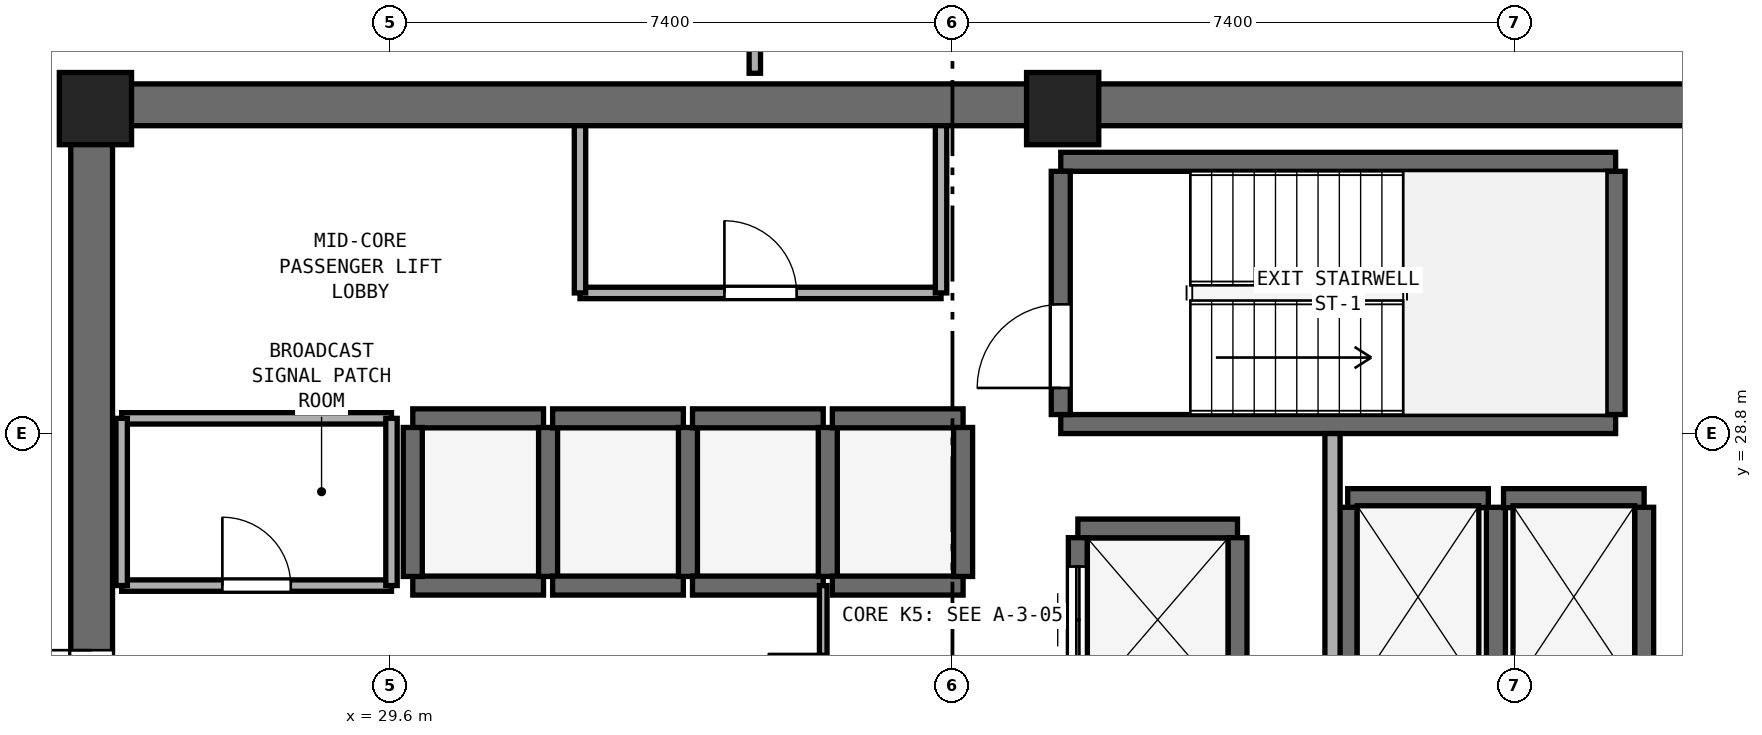
"""IFC4 building model, lengths in metres.
Left out: names, types, materials, properties, quantities, classifications, styles, units other than length and angle.
Written with IfcOpenShell. Run it as: python <this file> out.ifc"""

import sys

from ifc_helpers import new_model, si_unit, direction, frame, frame_2d, origin, origin_2d, place, context, subcontext, project, spatial, rectangle, extrude, element, fill, save


model = new_model("IFC4")
c1 = context("Model", 3, precision=1e-05, world=origin(), true_north=direction((0.0, 1.0)))
c2 = subcontext(c1, "Body", "Model", "MODEL_VIEW")
j1 = project(units=[si_unit("LENGTHUNIT", "METRE"), si_unit("PLANEANGLEUNIT", "RADIAN")], contexts=[c1])
p1 = place(None, origin())
s1 = spatial("IfcSite", under=j1, at=p1, CompositionType="ELEMENT")
p2 = place(p1, origin())
s2 = spatial("IfcBuilding", under=s1, at=p2, CompositionType="ELEMENT")
p3 = place(p2, frame((0.0, 0.0, 144.0)))
s3 = spatial("IfcBuildingStorey", under=s2, at=p3, CompositionType="ELEMENT", Elevation=144.0)
p4 = place(p3, frame((25.4, 33.125, 0.0), z_axis=(0.0, 0.0, 1.0), x_axis=(1.0, 0.0, 0.0)))
e1 = element("IfcWall", 1, at=p4, inside=s3, PredefinedType="SHEAR", context=c2, shape_type="SweptSolid", body=[
    extrude(rectangle(XDim=23.2, YDim=0.55, at=frame_2d((11.6, 0.0))), origin(), (0.0, 0.0, 1.0), 3.54),
])
p5 = place(p3, frame((25.675, 17.55, 0.0), z_axis=(0.0, 0.0, 1.0), x_axis=(0.0, 1.0, 0.0)))
e2 = element("IfcWall", 2, at=p5, inside=s3, PredefinedType="SHEAR", context=c2, shape_type="SweptSolid", body=[
    extrude(rectangle(XDim=15.3, YDim=0.55, at=frame_2d((7.65, 0.0))), origin(), (0.0, 0.0, 1.0), 3.54),
])
p6 = place(p5, frame((6.9, 0.0, 0.0)))
e3 = element("IfcOpeningElement", 3, at=p6, cuts=e2, PredefinedType="OPENING", context=c2, shape_type="SweptSolid", body=[
    extrude(rectangle(XDim=1.5, YDim=2.15, at=frame_2d((0.75, 1.075))), frame((0.0, 0.285, 0.0), z_axis=(0.0, -1.0, 0.0), x_axis=(1.0, 0.0, 0.0)), (0.0, 0.0, 1.0), 0.57),
])
for number, where, z_axis, x_axis in (
    (4, (38.45, 33.075, 0.0), (0.0, 0.0, 1.0), (1.0, 0.0, 0.0)),
    (5, (25.725, 33.075, 0.0), (0.0, 0.0, 1.0), (1.0, 0.0, 0.0)),
):
    element("IfcColumn", number, at=place(p3, frame(where, z_axis=z_axis, x_axis=x_axis)), inside=s3, PredefinedType="PILASTER", context=c2, shape_type="SweptSolid", body=[
        extrude(rectangle(XDim=0.95, YDim=0.95, at=origin_2d()), origin(), (0.0, 0.0, 1.0), 3.8),
    ])
for number, where, z_axis, x_axis in (
    (6, (38.425, 28.925, 0.0), (0.0, 0.0, 1.0), (1.0, 0.0, 0.0)),
    (7, (38.425, 32.375, 0.0), (0.0, 0.0, 1.0), (1.0, 0.0, 0.0)),
):
    element("IfcWall", number, at=place(p3, frame(where, z_axis=z_axis, x_axis=x_axis)), inside=s3, PredefinedType="SHEAR", context=c2, shape_type="SweptSolid", body=[
        extrude(rectangle(XDim=7.3, YDim=0.25, at=frame_2d((3.65, 0.0))), origin(), (0.0, 0.0, 1.0), 3.54),
    ])
p7 = place(p3, frame((38.425, 29.05, 0.0), z_axis=(0.0, 0.0, 1.0), x_axis=(0.0, 1.0, 0.0)))
e8 = element("IfcWall", 8, at=p7, inside=s3, PredefinedType="SHEAR", context=c2, shape_type="SweptSolid", body=[
    extrude(rectangle(XDim=3.2, YDim=0.25, at=frame_2d((1.6, 0.0))), origin(), (0.0, 0.0, 1.0), 3.54),
])
p8 = place(p7, frame((0.35, 0.0, 0.0)))
e9 = element("IfcOpeningElement", 9, at=p8, cuts=e8, PredefinedType="OPENING", context=c2, shape_type="SweptSolid", body=[
    extrude(rectangle(XDim=1.1, YDim=2.15, at=frame_2d((0.55, 1.075))), frame((0.0, 0.135, 0.0), z_axis=(0.0, -1.0, 0.0), x_axis=(1.0, 0.0, 0.0)), (0.0, 0.0, 1.0), 0.27),
])
p9 = place(p3, frame((45.725, 29.05, 0.0), z_axis=(0.0, 0.0, 1.0), x_axis=(0.0, 1.0, 0.0)))
e10 = element("IfcWall", 10, at=p9, inside=s3, PredefinedType="SHEAR", context=c2, shape_type="SweptSolid", body=[
    extrude(rectangle(XDim=3.2, YDim=0.25, at=frame_2d((1.6, 0.0))), origin(), (0.0, 0.0, 1.0), 3.54),
])
for number, where, z_axis, x_axis in (
    (11, (29.9, 26.8, 0.0), (0.0, 0.0, 1.0), (1.0, 0.0, 0.0)),
    (12, (29.9, 29.0, 0.0), (0.0, 0.0, 1.0), (1.0, 0.0, 0.0)),
):
    element("IfcWall", number, at=place(p3, frame(where, z_axis=z_axis, x_axis=x_axis)), inside=s3, PredefinedType="SHEAR", context=c2, shape_type="SweptSolid", body=[
        extrude(rectangle(XDim=1.72, YDim=0.25, at=frame_2d((0.86, 0.0))), origin(), (0.0, 0.0, 1.0), 3.54),
    ])
for number, where, z_axis, x_axis in (
    (13, (29.9, 26.92, 0.0), (0.0, 0.0, 1.0), (0.0, 1.0, 0.0)),
    (14, (31.68, 26.92, 0.0), (0.0, 0.0, 1.0), (0.0, 1.0, 0.0)),
):
    element("IfcWall", number, at=place(p3, frame(where, z_axis=z_axis, x_axis=x_axis)), inside=s3, PredefinedType="SHEAR", context=c2, shape_type="SweptSolid", body=[
        extrude(rectangle(XDim=1.96, YDim=0.25, at=frame_2d((0.98, 0.0))), origin(), (0.0, 0.0, 1.0), 3.54),
    ])
for number, where, z_axis, x_axis in (
    (15, (31.74, 26.8, 0.0), (0.0, 0.0, 1.0), (1.0, 0.0, 0.0)),
    (16, (31.74, 29.0, 0.0), (0.0, 0.0, 1.0), (1.0, 0.0, 0.0)),
):
    element("IfcWall", number, at=place(p3, frame(where, z_axis=z_axis, x_axis=x_axis)), inside=s3, PredefinedType="SHEAR", context=c2, shape_type="SweptSolid", body=[
        extrude(rectangle(XDim=1.72, YDim=0.25, at=frame_2d((0.86, 0.0))), origin(), (0.0, 0.0, 1.0), 3.54),
    ])
p10 = place(p3, frame((33.52, 26.92, 0.0), z_axis=(0.0, 0.0, 1.0), x_axis=(0.0, 1.0, 0.0)))
e17 = element("IfcWall", 17, at=p10, inside=s3, PredefinedType="SHEAR", context=c2, shape_type="SweptSolid", body=[
    extrude(rectangle(XDim=1.96, YDim=0.25, at=frame_2d((0.98, 0.0))), origin(), (0.0, 0.0, 1.0), 3.54),
])
for number, where, z_axis, x_axis in (
    (18, (33.58, 26.8, 0.0), (0.0, 0.0, 1.0), (1.0, 0.0, 0.0)),
    (19, (33.58, 29.0, 0.0), (0.0, 0.0, 1.0), (1.0, 0.0, 0.0)),
):
    element("IfcWall", number, at=place(p3, frame(where, z_axis=z_axis, x_axis=x_axis)), inside=s3, PredefinedType="SHEAR", context=c2, shape_type="SweptSolid", body=[
        extrude(rectangle(XDim=1.72, YDim=0.25, at=frame_2d((0.86, 0.0))), origin(), (0.0, 0.0, 1.0), 3.54),
    ])
p11 = place(p3, frame((35.36, 26.92, 0.0), z_axis=(0.0, 0.0, 1.0), x_axis=(0.0, 1.0, 0.0)))
e20 = element("IfcWall", 20, at=p11, inside=s3, PredefinedType="SHEAR", context=c2, shape_type="SweptSolid", body=[
    extrude(rectangle(XDim=1.96, YDim=0.25, at=frame_2d((0.98, 0.0))), origin(), (0.0, 0.0, 1.0), 3.54),
])
for number, where, z_axis, x_axis in (
    (21, (35.42, 26.8, 0.0), (0.0, 0.0, 1.0), (1.0, 0.0, 0.0)),
    (22, (35.42, 29.0, 0.0), (0.0, 0.0, 1.0), (1.0, 0.0, 0.0)),
):
    element("IfcWall", number, at=place(p3, frame(where, z_axis=z_axis, x_axis=x_axis)), inside=s3, PredefinedType="SHEAR", context=c2, shape_type="SweptSolid", body=[
        extrude(rectangle(XDim=1.72, YDim=0.25, at=frame_2d((0.86, 0.0))), origin(), (0.0, 0.0, 1.0), 3.54),
    ])
p12 = place(p3, frame((37.14, 26.92, 0.0), z_axis=(0.0, 0.0, 1.0), x_axis=(0.0, 1.0, 0.0)))
e23 = element("IfcWall", 23, at=p12, inside=s3, PredefinedType="SHEAR", context=c2, shape_type="SweptSolid", body=[
    extrude(rectangle(XDim=1.96, YDim=0.25, at=frame_2d((0.98, 0.0))), origin(), (0.0, 0.0, 1.0), 3.54),
])
p13 = place(p3, frame((42.2, 27.95, 0.0), z_axis=(0.0, 0.0, 1.0), x_axis=(1.0, 0.0, 0.0)))
e24 = element("IfcWall", 24, at=p13, inside=s3, PredefinedType="SHEAR", context=c2, shape_type="SweptSolid", body=[
    extrude(rectangle(XDim=1.85, YDim=0.25, at=frame_2d((0.925, 0.0))), origin(), (0.0, 0.0, 1.0), 3.54),
])
for number, where, z_axis, x_axis in (
    (25, (42.2, 25.47, 0.0), (0.0, 0.0, 1.0), (0.0, 1.0, 0.0)),
    (26, (44.15, 25.47, 0.0), (0.0, 0.0, 1.0), (0.0, 1.0, 0.0)),
):
    element("IfcWall", number, at=place(p3, frame(where, z_axis=z_axis, x_axis=x_axis)), inside=s3, PredefinedType="SHEAR", context=c2, shape_type="SweptSolid", body=[
        extrude(rectangle(XDim=2.36, YDim=0.25, at=frame_2d((1.18, 0.0))), origin(), (0.0, 0.0, 1.0), 3.54),
    ])
p14 = place(p3, frame((44.25, 27.95, 0.0), z_axis=(0.0, 0.0, 1.0), x_axis=(1.0, 0.0, 0.0)))
e27 = element("IfcWall", 27, at=p14, inside=s3, PredefinedType="SHEAR", context=c2, shape_type="SweptSolid", body=[
    extrude(rectangle(XDim=1.85, YDim=0.25, at=frame_2d((0.925, 0.0))), origin(), (0.0, 0.0, 1.0), 3.54),
])
p15 = place(p3, frame((46.1, 25.47, 0.0), z_axis=(0.0, 0.0, 1.0), x_axis=(0.0, 1.0, 0.0)))
e28 = element("IfcWall", 28, at=p15, inside=s3, PredefinedType="SHEAR", context=c2, shape_type="SweptSolid", body=[
    extrude(rectangle(XDim=2.36, YDim=0.25, at=frame_2d((1.18, 0.0))), origin(), (0.0, 0.0, 1.0), 3.54),
])
p16 = place(p3, frame((38.65, 27.55, 0.0), z_axis=(0.0, 0.0, 1.0), x_axis=(1.0, 0.0, 0.0)))
e29 = element("IfcWall", 29, at=p16, inside=s3, PredefinedType="SHEAR", context=c2, shape_type="SweptSolid", body=[
    extrude(rectangle(XDim=2.1, YDim=0.25, at=frame_2d((1.05, 0.0))), origin(), (0.0, 0.0, 1.0), 3.54),
])
p17 = place(p3, frame((38.65, 25.27, 0.0), z_axis=(0.0, 0.0, 1.0), x_axis=(0.0, 1.0, 0.0)))
e30 = element("IfcWall", 30, at=p17, inside=s3, PredefinedType="SHEAR", context=c2, shape_type="SweptSolid", body=[
    extrude(rectangle(XDim=2.16, YDim=0.25, at=frame_2d((1.08, 0.0))), origin(), (0.0, 0.0, 1.0), 3.54),
])
p18 = place(p17, frame((0.38, 0.0, 0.0)))
e31 = element("IfcOpeningElement", 31, at=p18, cuts=e30, PredefinedType="OPENING", context=c2, shape_type="SweptSolid", body=[
    extrude(rectangle(XDim=1.4, YDim=2.2, at=frame_2d((0.7, 1.1))), frame((0.0, 0.135, 0.0), z_axis=(0.0, -1.0, 0.0), x_axis=(1.0, 0.0, 0.0)), (0.0, 0.0, 1.0), 0.27),
])
p19 = place(p3, frame((40.75, 25.27, 0.0), z_axis=(0.0, 0.0, 1.0), x_axis=(0.0, 1.0, 0.0)))
e32 = element("IfcWall", 32, at=p19, inside=s3, PredefinedType="SHEAR", context=c2, shape_type="SweptSolid", body=[
    extrude(rectangle(XDim=2.16, YDim=0.25, at=frame_2d((1.08, 0.0))), origin(), (0.0, 0.0, 1.0), 3.54),
])
p20 = place(p3, frame((42.0, 22.75, 0.0), z_axis=(0.0, 0.0, 1.0), x_axis=(0.0, 1.0, 0.0)))
e33 = element("IfcWall", 33, at=p20, inside=s3, PredefinedType="SOLIDWALL", context=c2, shape_type="SweptSolid", body=[
    extrude(rectangle(XDim=6.05, YDim=0.2, at=frame_2d((3.025, 0.0))), origin(), (0.0, 0.0, 1.0), 3.54),
])
p21 = place(p20, frame((0.65, 0.0, 0.0)))
e34 = element("IfcOpeningElement", 34, at=p21, cuts=e33, PredefinedType="OPENING", context=c2, shape_type="SweptSolid", body=[
    extrude(rectangle(XDim=1.2, YDim=2.15, at=frame_2d((0.6, 1.075))), frame((0.0, 0.11, 0.0), z_axis=(0.0, -1.0, 0.0), x_axis=(1.0, 0.0, 0.0)), (0.0, 0.0, 1.0), 0.22),
])
p22 = place(p3, frame((32.1, 30.65, 0.0), z_axis=(0.0, 0.0, 1.0), x_axis=(1.0, 0.0, 0.0)))
e35 = element("IfcWall", 35, at=p22, inside=s3, PredefinedType="PARTITIONING", context=c2, shape_type="SweptSolid", body=[
    extrude(rectangle(XDim=4.75, YDim=0.15, at=frame_2d((2.375, 0.0))), origin(), (0.0, 0.0, 1.0), 3.54),
])
p23 = place(p22, frame((1.9, 0.0, 0.0)))
e36 = element("IfcOpeningElement", 36, at=p23, cuts=e35, PredefinedType="OPENING", context=c2, shape_type="SweptSolid", body=[
    extrude(rectangle(XDim=0.95, YDim=2.1, at=frame_2d((0.475, 1.05))), frame((0.0, 0.085, 0.0), z_axis=(0.0, -1.0, 0.0), x_axis=(1.0, 0.0, 0.0)), (0.0, 0.0, 1.0), 0.17),
])
for number, where, z_axis, x_axis in (
    (37, (32.1, 30.65, 0.0), (0.0, 0.0, 1.0), (0.0, 1.0, 0.0)),
    (38, (36.85, 30.65, 0.0), (0.0, 0.0, 1.0), (0.0, 1.0, 0.0)),
):
    element("IfcWall", number, at=place(p3, frame(where, z_axis=z_axis, x_axis=x_axis)), inside=s3, PredefinedType="PARTITIONING", context=c2, shape_type="SweptSolid", body=[
        extrude(rectangle(XDim=2.2, YDim=0.15, at=frame_2d((1.1, 0.0))), origin(), (0.0, 0.0, 1.0), 3.54),
    ])
p24 = place(p3, frame((26.07, 26.8, 0.0), z_axis=(0.0, 0.0, 1.0), x_axis=(1.0, 0.0, 0.0)))
e39 = element("IfcWall", 39, at=p24, inside=s3, PredefinedType="PARTITIONING", context=c2, shape_type="SweptSolid", body=[
    extrude(rectangle(XDim=3.55, YDim=0.15, at=frame_2d((1.775, 0.0))), origin(), (0.0, 0.0, 1.0), 3.54),
])
p25 = place(p24, frame((1.325, 0.0, 0.0)))
e40 = element("IfcOpeningElement", 40, at=p25, cuts=e39, PredefinedType="OPENING", context=c2, shape_type="SweptSolid", body=[
    extrude(rectangle(XDim=0.9, YDim=2.1, at=frame_2d((0.45, 1.05))), frame((0.0, 0.085, 0.0), z_axis=(0.0, -1.0, 0.0), x_axis=(1.0, 0.0, 0.0)), (0.0, 0.0, 1.0), 0.17),
])
p26 = place(p3, frame((26.07, 29.0, 0.0), z_axis=(0.0, 0.0, 1.0), x_axis=(1.0, 0.0, 0.0)))
e41 = element("IfcWall", 41, at=p26, inside=s3, PredefinedType="PARTITIONING", context=c2, shape_type="SweptSolid", body=[
    extrude(rectangle(XDim=3.55, YDim=0.15, at=frame_2d((1.775, 0.0))), origin(), (0.0, 0.0, 1.0), 3.54),
])
p27 = place(p3, frame((26.07, 26.8, 0.0), z_axis=(0.0, 0.0, 1.0), x_axis=(0.0, 1.0, 0.0)))
e42 = element("IfcWall", 42, at=p27, inside=s3, PredefinedType="PARTITIONING", context=c2, shape_type="SweptSolid", body=[
    extrude(rectangle(XDim=2.2, YDim=0.15, at=frame_2d((1.1, 0.0))), origin(), (0.0, 0.0, 1.0), 2.64),
])
p28 = place(p3, frame((29.62, 26.8, 0.0), z_axis=(0.0, 0.0, 1.0), x_axis=(0.0, 1.0, 0.0)))
e43 = element("IfcWall", 43, at=p28, inside=s3, PredefinedType="PARTITIONING", context=c2, shape_type="SweptSolid", body=[
    extrude(rectangle(XDim=2.2, YDim=0.15, at=frame_2d((1.1, 0.0))), origin(), (0.0, 0.0, 1.0), 3.54),
])
p29 = place(p3, frame((35.3, 23.6, 0.0), z_axis=(0.0, 0.0, 1.0), x_axis=(0.0, 1.0, 0.0)))
e44 = element("IfcWall", 44, at=p29, inside=s3, PredefinedType="PARTITIONING", context=c2, shape_type="SweptSolid", body=[
    extrude(rectangle(XDim=3.2, YDim=0.1, at=frame_2d((1.6, 0.0))), origin(), (0.0, 0.0, 1.0), 3.54),
])
p30 = place(p29, frame((0.85, 0.0, 0.0)))
e45 = element("IfcOpeningElement", 45, at=p30, cuts=e44, PredefinedType="OPENING", context=c2, shape_type="SweptSolid", body=[
    extrude(rectangle(XDim=1.45, YDim=2.12, at=frame_2d((0.725, 1.06))), frame((0.0, 0.06, 0.0), z_axis=(0.0, -1.0, 0.0), x_axis=(1.0, 0.0, 0.0)), (0.0, 0.0, 1.0), 0.12),
])
p31 = place(p3, frame((34.4, 33.54, 0.0), z_axis=(0.0, 0.0, 1.0), x_axis=(0.0, 1.0, 0.0)))
e46 = element("IfcWall", 46, at=p31, inside=s3, PredefinedType="PARTITIONING", context=c2, shape_type="SweptSolid", body=[
    extrude(rectangle(XDim=2.76, YDim=0.15, at=frame_2d((1.38, 0.0))), origin(), (0.0, 0.0, 1.0), 3.54),
])
p32 = place(p8, origin())
e47 = element("IfcDoor", 47, at=p32, inside=s3, OperationType="SINGLE_SWING_LEFT", PredefinedType="DOOR", context=c2, shape_type="SweptSolid", body=[
    extrude(rectangle(XDim=1.1, YDim=2.15, at=frame_2d((0.55, 1.075))), frame((0.0, 0.025, 0.0), z_axis=(0.0, -1.0, 0.0), x_axis=(1.0, 0.0, 0.0)), (0.0, 0.0, 1.0), 0.05),
])
fill(e9, e47)
p33 = place(p18, origin())
e48 = element("IfcDoor", 48, at=p33, inside=s3, OperationType="DOUBLE_DOOR_SLIDING", PredefinedType="DOOR", context=c2, shape_type="SweptSolid", body=[
    extrude(rectangle(XDim=1.4, YDim=2.2, at=frame_2d((0.7, 1.1))), frame((0.0, 0.025, 0.0), z_axis=(0.0, -1.0, 0.0), x_axis=(1.0, 0.0, 0.0)), (0.0, 0.0, 1.0), 0.05),
])
fill(e31, e48)
p34 = place(p6, origin())
e49 = element("IfcDoor", 49, at=p34, inside=s3, OperationType="DOUBLE_DOOR_SINGLE_SWING", PredefinedType="DOOR", context=c2, shape_type="SweptSolid", body=[
    extrude(rectangle(XDim=1.5, YDim=2.15, at=frame_2d((0.75, 1.075))), frame((0.0, 0.025, 0.0), z_axis=(0.0, -1.0, 0.0), x_axis=(1.0, 0.0, 0.0)), (0.0, 0.0, 1.0), 0.05),
])
fill(e3, e49)
p35 = place(p23, origin())
e50 = element("IfcDoor", 50, at=p35, inside=s3, OperationType="SINGLE_SWING_LEFT", PredefinedType="DOOR", context=c2, shape_type="SweptSolid", body=[
    extrude(rectangle(XDim=0.95, YDim=2.1, at=frame_2d((0.475, 1.05))), frame((0.0, 0.025, 0.0), z_axis=(0.0, -1.0, 0.0), x_axis=(1.0, 0.0, 0.0)), (0.0, 0.0, 1.0), 0.05),
])
fill(e36, e50)
p36 = place(p25, origin())
e51 = element("IfcDoor", 51, at=p36, inside=s3, OperationType="SINGLE_SWING_LEFT", PredefinedType="DOOR", context=c2, shape_type="SweptSolid", body=[
    extrude(rectangle(XDim=0.9, YDim=2.1, at=frame_2d((0.45, 1.05))), frame((0.0, 0.025, 0.0), z_axis=(0.0, -1.0, 0.0), x_axis=(1.0, 0.0, 0.0)), (0.0, 0.0, 1.0), 0.05),
])
fill(e40, e51)
p37 = place(p30, origin())
e52 = element("IfcDoor", 52, at=p37, inside=s3, OperationType="DOUBLE_DOOR_SINGLE_SWING", PredefinedType="DOOR", context=c2, shape_type="SweptSolid", body=[
    extrude(rectangle(XDim=1.45, YDim=2.12, at=frame_2d((0.725, 1.06))), frame((0.0, 0.025, 0.0), z_axis=(0.0, -1.0, 0.0), x_axis=(1.0, 0.0, 0.0)), (0.0, 0.0, 1.0), 0.05),
])
fill(e45, e52)
save(model, sys.argv[1])
